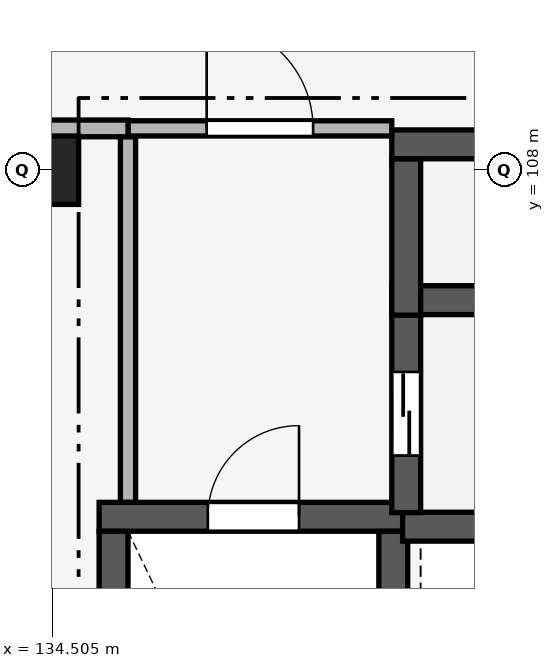
"""IFC4 building model, lengths in metres.
Left out: names, types, materials, properties, quantities, classifications, styles, units other than length and angle.
Written with IfcOpenShell. Run it as: python <this file> out.ifc"""

import sys

from ifc_helpers import new_model, si_unit, direction, frame, frame_2d, origin, origin_2d, place, context, subcontext, project, spatial, rectangle, extrude, element, fill, save


model = new_model("IFC4")
c1 = context("Model", 3, precision=1e-05, world=origin(), true_north=direction((0.0, 1.0)))
c2 = subcontext(c1, "Body", "Model", "MODEL_VIEW")
j1 = project(units=[si_unit("LENGTHUNIT", "METRE"), si_unit("PLANEANGLEUNIT", "RADIAN")], contexts=[c1])
p1 = place(None, origin())
s1 = spatial("IfcSite", under=j1, at=p1, CompositionType="ELEMENT")
p2 = place(p1, origin())
s2 = spatial("IfcBuilding", under=s1, at=p2, CompositionType="ELEMENT")
p3 = place(p2, origin())
s3 = spatial("IfcBuildingStorey", under=s2, at=p3, CompositionType="ELEMENT", Elevation=0.0)
p4 = place(p3, frame((134.4, 108.0, 0.0), z_axis=(0.0, 0.0, 1.0), x_axis=(1.0, 0.0, 0.0)))
e1 = element("IfcColumn", 1, at=p4, inside=s3, PredefinedType="COLUMN", context=c2, shape_type="SweptSolid", body=[
    extrude(rectangle(XDim=0.9, YDim=0.9, at=origin_2d()), origin(), (0.0, 0.0, 1.0), 5.1),
])
p5 = place(p3, frame((135.12, 103.44, 0.0), z_axis=(0.0, 0.0, 1.0), x_axis=(1.0, 0.0, 0.0)))
e2 = element("IfcWall", 2, at=p5, inside=s3, PredefinedType="SHEAR", context=c2, shape_type="SweptSolid", body=[
    extrude(rectangle(XDim=4.06, YDim=0.38, at=frame_2d((2.03, 0.0))), origin(), (0.0, 0.0, 1.0), 4.82),
])
p6 = place(p5, frame((1.43, 0.0, 0.0)))
e3 = element("IfcOpeningElement", 3, at=p6, cuts=e2, PredefinedType="OPENING", context=c2, shape_type="SweptSolid", body=[
    extrude(rectangle(XDim=1.2, YDim=2.2, at=frame_2d((0.6, 1.1))), frame((0.0, 0.205, 0.0), z_axis=(0.0, -1.0, 0.0), x_axis=(1.0, 0.0, 0.0)), (0.0, 0.0, 1.0), 0.41),
])
for number, where, z_axis, x_axis in (
    (4, (135.31, 96.352, 0.0), (0.0, 0.0, 1.0), (0.0, 1.0, 0.0)),
    (5, (138.99, 96.352, 0.0), (0.0, 0.0, 1.0), (0.0, 1.0, 0.0)),
):
    element("IfcWall", number, at=place(p3, frame(where, z_axis=z_axis, x_axis=x_axis)), inside=s3, PredefinedType="SHEAR", context=c2, shape_type="SweptSolid", body=[
        extrude(rectangle(XDim=6.896, YDim=0.38, at=frame_2d((3.448, 0.0))), origin(), (0.0, 0.0, 1.0), 4.82),
    ])
p7 = place(p3, frame((139.113, 103.31, 0.0), z_axis=(0.0, 0.0, 1.0), x_axis=(1.0, 0.0, 0.0)))
e6 = element("IfcWall", 6, at=p7, inside=s3, PredefinedType="SHEAR", context=c2, shape_type="SweptSolid", body=[
    extrude(rectangle(XDim=3.017, YDim=0.38, at=frame_2d((1.508, 0.0))), origin(), (0.0, 0.0, 1.0), 4.82),
])
p8 = place(p3, frame((138.97, 106.29, 0.0), z_axis=(0.0, 0.0, 1.0), x_axis=(1.0, 0.0, 0.0)))
e7 = element("IfcWall", 7, at=p8, inside=s3, PredefinedType="SHEAR", context=c2, shape_type="SweptSolid", body=[
    extrude(rectangle(XDim=3.16, YDim=0.38, at=frame_2d((1.58, 0.0))), origin(), (0.0, 0.0, 1.0), 4.82),
])
p9 = place(p3, frame((139.16, 103.495, 0.0), z_axis=(0.0, 0.0, 1.0), x_axis=(0.0, 1.0, 0.0)))
e8 = element("IfcWall", 8, at=p9, inside=s3, PredefinedType="SHEAR", context=c2, shape_type="SweptSolid", body=[
    extrude(rectangle(XDim=2.603, YDim=0.38, at=frame_2d((1.301, 0.0))), origin(), (0.0, 0.0, 1.0), 4.82),
])
p10 = place(p9, frame((0.751, 0.0, 0.0)))
e9 = element("IfcOpeningElement", 9, at=p10, cuts=e8, PredefinedType="OPENING", context=c2, shape_type="SweptSolid", body=[
    extrude(rectangle(XDim=1.1, YDim=2.15, at=frame_2d((0.55, 1.075))), frame((0.0, 0.205, 0.0), z_axis=(0.0, -1.0, 0.0), x_axis=(1.0, 0.0, 0.0)), (0.0, 0.0, 1.0), 0.41),
])
p11 = place(p3, frame((138.97, 108.34, 0.0), z_axis=(0.0, 0.0, 1.0), x_axis=(1.0, 0.0, 0.0)))
e10 = element("IfcWall", 10, at=p11, inside=s3, PredefinedType="SHEAR", context=c2, shape_type="SweptSolid", body=[
    extrude(rectangle(XDim=3.385, YDim=0.38, at=frame_2d((1.692, 0.0))), origin(), (0.0, 0.0, 1.0), 4.82),
])
p12 = place(p11, frame((1.142, 0.0, 0.0)))
e11 = element("IfcOpeningElement", 11, at=p12, cuts=e10, PredefinedType="OPENING", context=c2, shape_type="SweptSolid", body=[
    extrude(rectangle(XDim=1.1, YDim=2.15, at=frame_2d((0.55, 1.075))), frame((0.0, 0.205, 0.0), z_axis=(0.0, -1.0, 0.0), x_axis=(1.0, 0.0, 0.0)), (0.0, 0.0, 1.0), 0.41),
])
p13 = place(p3, frame((139.16, 106.093, 0.0), z_axis=(0.0, 0.0, 1.0), x_axis=(0.0, 1.0, 0.0)))
e12 = element("IfcWall", 12, at=p13, inside=s3, PredefinedType="SHEAR", context=c2, shape_type="SweptSolid", body=[
    extrude(rectangle(XDim=2.055, YDim=0.38, at=frame_2d((1.027, 0.0))), origin(), (0.0, 0.0, 1.0), 4.82),
])
p14 = place(p3, frame((135.5, 108.55, 0.0), z_axis=(0.0, 0.0, 1.0), x_axis=(1.0, 0.0, 0.0)))
e13 = element("IfcWall", 13, at=p14, inside=s3, PredefinedType="PARTITIONING", context=c2, shape_type="SweptSolid", body=[
    extrude(rectangle(XDim=3.47, YDim=0.2, at=frame_2d((1.735, 0.0))), origin(), (0.0, 0.0, 1.0), 4.82),
])
p15 = place(p14, frame((1.035, 0.0, 0.0)))
e14 = element("IfcOpeningElement", 14, at=p15, cuts=e13, PredefinedType="OPENING", context=c2, shape_type="SweptSolid", body=[
    extrude(rectangle(XDim=1.4, YDim=2.2, at=frame_2d((0.7, 1.1))), frame((0.0, 0.115, 0.0), z_axis=(0.0, -1.0, 0.0), x_axis=(1.0, 0.0, 0.0)), (0.0, 0.0, 1.0), 0.23),
])
p16 = place(p3, frame((134.25, 108.55, 0.0), z_axis=(0.0, 0.0, 1.0), x_axis=(1.0, 0.0, 0.0)))
e15 = element("IfcWall", 15, at=p16, inside=s3, PredefinedType="PARTITIONING", context=c2, shape_type="SweptSolid", body=[
    extrude(rectangle(XDim=1.25, YDim=0.22, at=frame_2d((0.625, 0.0))), origin(), (0.0, 0.0, 1.0), 4.17),
])
p17 = place(p3, frame((135.5, 103.632, 0.0), z_axis=(0.0, 0.0, 1.0), x_axis=(0.0, 1.0, 0.0)))
e16 = element("IfcWall", 16, at=p17, inside=s3, PredefinedType="PARTITIONING", context=c2, shape_type="SweptSolid", body=[
    extrude(rectangle(XDim=4.806, YDim=0.2, at=frame_2d((2.403, 0.0))), origin(), (0.0, 0.0, 1.0), 4.82),
])
p18 = place(p6, origin())
e17 = element("IfcDoor", 17, at=p18, inside=s3, OperationType="SINGLE_SWING_RIGHT", PredefinedType="DOOR", context=c2, shape_type="SweptSolid", body=[
    extrude(rectangle(XDim=1.2, YDim=2.2, at=frame_2d((0.6, 1.1))), frame((0.0, 0.025, 0.0), z_axis=(0.0, -1.0, 0.0), x_axis=(1.0, 0.0, 0.0)), (0.0, 0.0, 1.0), 0.05),
])
fill(e3, e17)
p19 = place(p10, origin())
e18 = element("IfcDoor", 18, at=p19, inside=s3, OperationType="DOUBLE_DOOR_SLIDING", PredefinedType="DOOR", context=c2, shape_type="SweptSolid", body=[
    extrude(rectangle(XDim=1.1, YDim=2.15, at=frame_2d((0.55, 1.075))), frame((0.0, 0.025, 0.0), z_axis=(0.0, -1.0, 0.0), x_axis=(1.0, 0.0, 0.0)), (0.0, 0.0, 1.0), 0.05),
])
fill(e9, e18)
p20 = place(p15, origin())
e19 = element("IfcDoor", 19, at=p20, inside=s3, OperationType="SINGLE_SWING_LEFT", PredefinedType="DOOR", context=c2, shape_type="SweptSolid", body=[
    extrude(rectangle(XDim=1.4, YDim=2.2, at=frame_2d((0.7, 1.1))), frame((0.0, 0.025, 0.0), z_axis=(0.0, -1.0, 0.0), x_axis=(1.0, 0.0, 0.0)), (0.0, 0.0, 1.0), 0.05),
])
fill(e14, e19)
save(model, sys.argv[1])
